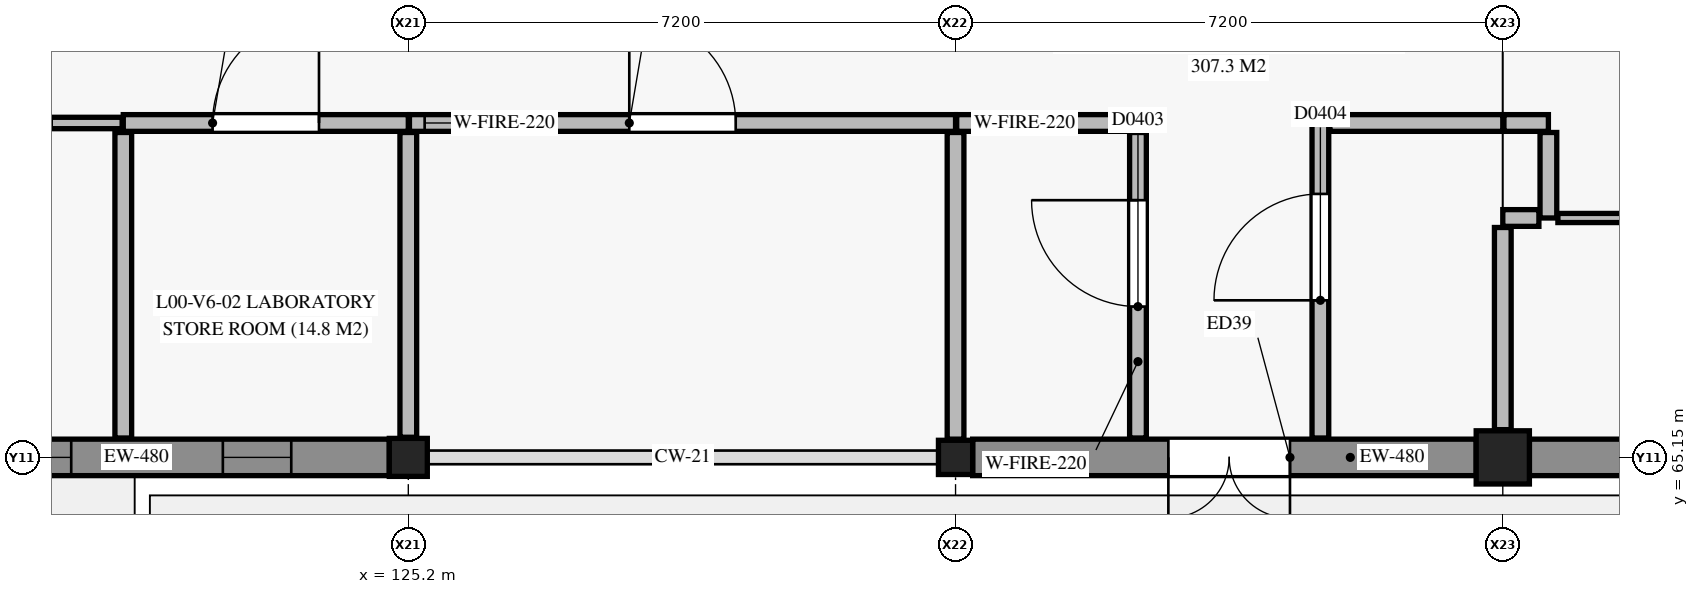
"""IFC4 building model, lengths in metres.
Left out: names, types, materials, properties, quantities, classifications, styles, units other than length and angle.
Written with IfcOpenShell. Run it as: python <this file> out.ifc"""

import sys

from ifc_helpers import new_model, si_unit, direction, frame, frame_2d, origin, origin_2d, place, context, subcontext, project, spatial, rectangle, circle, extrude, element, fill, save


model = new_model("IFC4")
c1 = context("Model", 3, precision=1e-05, world=origin(), true_north=direction((0.0, 1.0)))
c2 = subcontext(c1, "Body", "Model", "MODEL_VIEW")
j1 = project(units=[si_unit("LENGTHUNIT", "METRE"), si_unit("PLANEANGLEUNIT", "RADIAN")], contexts=[c1])
p1 = place(None, origin())
s1 = spatial("IfcSite", under=j1, at=p1, CompositionType="ELEMENT")
p2 = place(p1, origin())
s2 = spatial("IfcBuilding", under=s1, at=p2, CompositionType="ELEMENT")
p3 = place(p2, origin())
s3 = spatial("IfcBuildingStorey", under=s2, at=p3, CompositionType="ELEMENT", Elevation=0.0)
p4 = place(p3, frame((125.2, 65.15, 0.0), z_axis=(0.0, 0.0, 1.0), x_axis=(1.0, 0.0, 0.0)))
e1 = element("IfcColumn", 1, at=p4, inside=s3, PredefinedType="COLUMN", context=c2, shape_type="SweptSolid", body=[
    extrude(circle(Radius=0.25, at=origin_2d()), origin(), (0.0, 0.0, 1.0), 4.8),
])
p5 = place(p3, frame((132.4, 65.15, 0.0), z_axis=(0.0, 0.0, 1.0), x_axis=(1.0, 0.0, 0.0)))
e2 = element("IfcColumn", 2, at=p5, inside=s3, PredefinedType="COLUMN", context=c2, shape_type="SweptSolid", body=[
    extrude(rectangle(XDim=0.45, YDim=0.45, at=origin_2d()), origin(), (0.0, 0.0, 1.0), 4.8),
])
p6 = place(p3, frame((139.6, 65.15, 0.0), z_axis=(0.0, 0.0, 1.0), x_axis=(1.0, 0.0, 0.0)))
e3 = element("IfcColumn", 3, at=p6, inside=s3, PredefinedType="COLUMN", context=c2, shape_type="SweptSolid", body=[
    extrude(rectangle(XDim=0.7, YDim=0.7, at=origin_2d()), origin(), (0.0, 0.0, 1.0), 4.8),
])
p7 = place(p3, frame((146.55, 65.15, 0.0), z_axis=(0.0, 0.0, 1.0), x_axis=(-1.0, 0.0, 0.0)))
e4 = element("IfcWall", 4, at=p7, inside=s3, PredefinedType="SOLIDWALL", context=c2, shape_type="SweptSolid", body=[
    extrude(rectangle(XDim=6.6, YDim=0.48, at=frame_2d((3.3, 0.0))), origin(), (0.0, 0.0, 1.0), 3.7),
])
p8 = place(p7, frame((2.7, 0.0, 0.9)))
e5 = element("IfcOpeningElement", 5, at=p8, cuts=e4, PredefinedType="OPENING", context=c2, shape_type="SweptSolid", body=[
    extrude(rectangle(XDim=1.2, YDim=1.8, at=frame_2d((0.6, 0.9))), frame((0.0, 0.25, 0.0), z_axis=(0.0, -1.0, 0.0), x_axis=(1.0, 0.0, 0.0)), (0.0, 0.0, 1.0), 0.5),
])
p9 = place(p3, frame((139.25, 65.15, 0.0), z_axis=(0.0, 0.0, 1.0), x_axis=(-1.0, 0.0, 0.0)))
e6 = element("IfcWall", 6, at=p9, inside=s3, PredefinedType="SOLIDWALL", context=c2, shape_type="SweptSolid", body=[
    extrude(rectangle(XDim=6.625, YDim=0.48, at=frame_2d((3.312, 0.0))), origin(), (0.0, 0.0, 1.0), 3.7),
])
p10 = place(p9, frame((2.45, 0.0, 0.0)))
e7 = element("IfcOpeningElement", 7, at=p10, cuts=e6, PredefinedType="OPENING", context=c2, shape_type="SweptSolid", body=[
    extrude(rectangle(XDim=1.6, YDim=2.3, at=frame_2d((0.8, 1.15))), frame((0.0, 0.25, 0.0), z_axis=(0.0, -1.0, 0.0), x_axis=(1.0, 0.0, 0.0)), (0.0, 0.0, 1.0), 0.5),
])
p11 = place(p3, frame((124.95, 65.15, 0.0), z_axis=(0.0, 0.0, 1.0), x_axis=(-1.0, 0.0, 0.0)))
e8 = element("IfcWall", 8, at=p11, inside=s3, PredefinedType="SOLIDWALL", context=c2, shape_type="SweptSolid", body=[
    extrude(rectangle(XDim=6.65, YDim=0.48, at=frame_2d((3.325, 0.0))), origin(), (0.0, 0.0, 1.0), 3.7),
])
p12 = place(p11, frame((1.29, 0.0, 0.9)))
e9 = element("IfcOpeningElement", 9, at=p12, cuts=e8, PredefinedType="OPENING", context=c2, shape_type="SweptSolid", body=[
    extrude(rectangle(XDim=0.9, YDim=1.2, at=frame_2d((0.45, 0.6))), frame((0.0, 0.25, 0.0), z_axis=(0.0, -1.0, 0.0), x_axis=(1.0, 0.0, 0.0)), (0.0, 0.0, 1.0), 0.5),
])
p13 = place(p11, frame((4.185, 0.0, 0.9)))
e10 = element("IfcOpeningElement", 10, at=p13, cuts=e8, PredefinedType="OPENING", context=c2, shape_type="SweptSolid", body=[
    extrude(rectangle(XDim=1.8, YDim=0.9, at=frame_2d((0.9, 0.45))), frame((0.0, 0.25, 0.0), z_axis=(0.0, -1.0, 0.0), x_axis=(1.0, 0.0, 0.0)), (0.0, 0.0, 1.0), 0.5),
])
p14 = place(p3, frame((121.45, 69.55, 0.0), z_axis=(0.0, 0.0, 1.0), x_axis=(1.0, 0.0, 0.0)))
e11 = element("IfcWall", 11, at=p14, inside=s3, PredefinedType="PARTITIONING", context=c2, shape_type="SweptSolid", body=[
    extrude(rectangle(XDim=3.75, YDim=0.22, at=frame_2d((1.875, 0.0))), origin(), (0.0, 0.0, 1.0), 3.985),
])
p15 = place(p14, frame((1.175, 0.0, 0.0)))
e12 = element("IfcOpeningElement", 12, at=p15, cuts=e11, PredefinedType="OPENING", context=c2, shape_type="SweptSolid", body=[
    extrude(rectangle(XDim=1.4, YDim=2.2, at=frame_2d((0.7, 1.1))), frame((0.0, 0.12, 0.0), z_axis=(0.0, -1.0, 0.0), x_axis=(1.0, 0.0, 0.0)), (0.0, 0.0, 1.0), 0.24),
])
p16 = place(p3, frame((125.215, 69.55, 0.0), z_axis=(0.0, 0.0, 1.0), x_axis=(1.0, 0.0, 0.0)))
e13 = element("IfcWall", 13, at=p16, inside=s3, PredefinedType="PARTITIONING", context=c2, shape_type="SweptSolid", body=[
    extrude(rectangle(XDim=7.185, YDim=0.22, at=frame_2d((3.592, 0.0))), origin(), (0.0, 0.0, 1.0), 3.855),
])
p17 = place(p16, frame((2.893, 0.0, 0.0)))
e14 = element("IfcOpeningElement", 14, at=p17, cuts=e13, PredefinedType="OPENING", context=c2, shape_type="SweptSolid", body=[
    extrude(rectangle(XDim=1.4, YDim=2.2, at=frame_2d((0.7, 1.1))), frame((0.0, 0.12, 0.0), z_axis=(0.0, -1.0, 0.0), x_axis=(1.0, 0.0, 0.0)), (0.0, 0.0, 1.0), 0.24),
])
p18 = place(p16, frame((0.2, 0.0, 1.05)))
e15 = element("IfcOpeningElement", 15, at=p18, cuts=e13, PredefinedType="OPENING", context=c2, shape_type="SweptSolid", body=[
    extrude(rectangle(XDim=1.4, YDim=1.1, at=frame_2d((0.7, 0.55))), frame((0.0, 0.12, 0.0), z_axis=(0.0, -1.0, 0.0), x_axis=(1.0, 0.0, 0.0)), (0.0, 0.0, 1.0), 0.24),
])
p19 = place(p3, frame((132.415, 69.55, 0.0), z_axis=(0.0, 0.0, 1.0), x_axis=(1.0, 0.0, 0.0)))
e16 = element("IfcWall", 16, at=p19, inside=s3, PredefinedType="PARTITIONING", context=c2, shape_type="SweptSolid", body=[
    extrude(rectangle(XDim=2.385, YDim=0.22, at=frame_2d((1.192, 0.0))), origin(), (0.0, 0.0, 1.0), 3.855),
])
p20 = place(p3, frame((134.8, 65.405, 0.0), z_axis=(0.0, 0.0, 1.0), x_axis=(0.0, 1.0, 0.0)))
e17 = element("IfcWall", 17, at=p20, inside=s3, PredefinedType="PARTITIONING", context=c2, shape_type="SweptSolid", body=[
    extrude(rectangle(XDim=4.02, YDim=0.22, at=frame_2d((2.01, 0.0))), origin(), (0.0, 0.0, 1.0), 4.045),
])
p21 = place(p20, frame((1.729, 0.0, 0.0)))
e18 = element("IfcOpeningElement", 18, at=p21, cuts=e17, PredefinedType="OPENING", context=c2, shape_type="SweptSolid", body=[
    extrude(rectangle(XDim=1.4, YDim=2.2, at=frame_2d((0.7, 1.1))), frame((0.0, 0.12, 0.0), z_axis=(0.0, -1.0, 0.0), x_axis=(1.0, 0.0, 0.0)), (0.0, 0.0, 1.0), 0.24),
])
p22 = place(p3, frame((137.2, 65.405, 0.0), z_axis=(0.0, 0.0, 1.0), x_axis=(0.0, 1.0, 0.0)))
e19 = element("IfcWall", 19, at=p22, inside=s3, PredefinedType="PARTITIONING", context=c2, shape_type="SweptSolid", body=[
    extrude(rectangle(XDim=4.145, YDim=0.22, at=frame_2d((2.073, 0.0))), origin(), (0.0, 0.0, 1.0), 4.045),
])
p23 = place(p22, frame((1.812, 0.0, 0.0)))
e20 = element("IfcOpeningElement", 20, at=p23, cuts=e19, PredefinedType="OPENING", context=c2, shape_type="SweptSolid", body=[
    extrude(rectangle(XDim=1.4, YDim=2.2, at=frame_2d((0.7, 1.1))), frame((0.0, 0.12, 0.0), z_axis=(0.0, -1.0, 0.0), x_axis=(1.0, 0.0, 0.0)), (0.0, 0.0, 1.0), 0.24),
])
p24 = place(p3, frame((137.325, 69.55, 0.0), z_axis=(0.0, 0.0, 1.0), x_axis=(1.0, 0.0, 0.0)))
e21 = element("IfcWall", 21, at=p24, inside=s3, PredefinedType="PARTITIONING", context=c2, shape_type="SweptSolid", body=[
    extrude(rectangle(XDim=2.275, YDim=0.22, at=frame_2d((1.138, 0.0))), origin(), (0.0, 0.0, 1.0), 3.955),
])
p25 = place(p3, frame((139.615, 69.55, 0.0), z_axis=(0.0, 0.0, 1.0), x_axis=(1.0, 0.0, 0.0)))
e22 = element("IfcWall", 22, at=p25, inside=s3, PredefinedType="PARTITIONING", context=c2, shape_type="SweptSolid", body=[
    extrude(rectangle(XDim=0.585, YDim=0.22, at=frame_2d((0.292, 0.0))), origin(), (0.0, 0.0, 1.0), 3.955),
])
p26 = place(p3, frame((140.2, 68.3, 0.0), z_axis=(0.0, 0.0, 1.0), x_axis=(0.0, 1.0, 0.0)))
e23 = element("IfcWall", 23, at=p26, inside=s3, PredefinedType="PARTITIONING", context=c2, shape_type="SweptSolid", body=[
    extrude(rectangle(XDim=1.125, YDim=0.22, at=frame_2d((0.562, 0.0))), origin(), (0.0, 0.0, 1.0), 4.52),
])
p27 = place(p3, frame((139.6, 68.3, 0.0), z_axis=(0.0, 0.0, 1.0), x_axis=(1.0, 0.0, 0.0)))
e24 = element("IfcWall", 24, at=p27, inside=s3, PredefinedType="PARTITIONING", context=c2, shape_type="SweptSolid", body=[
    extrude(rectangle(XDim=0.475, YDim=0.22, at=frame_2d((0.237, 0.0))), origin(), (0.0, 0.0, 1.0), 3.955),
])
p28 = place(p3, frame((120.49, 69.55, 0.0), z_axis=(0.0, 0.0, 1.0), x_axis=(1.0, 0.0, 0.0)))
e25 = element("IfcWall", 25, at=p28, inside=s3, PredefinedType="PARTITIONING", context=c2, shape_type="SweptSolid", body=[
    extrude(rectangle(XDim=0.945, YDim=0.15, at=frame_2d((0.473, 0.0))), origin(), (0.0, 0.0, 1.0), 4.52),
])
p29 = place(p3, frame((140.325, 68.3, 0.0), z_axis=(0.0, 0.0, 1.0), x_axis=(1.0, 0.0, 0.0)))
e26 = element("IfcWall", 26, at=p29, inside=s3, PredefinedType="PARTITIONING", context=c2, shape_type="SweptSolid", body=[
    extrude(rectangle(XDim=2.16, YDim=0.12, at=frame_2d((1.08, 0.0))), origin(), (0.0, 0.0, 1.0), 4.52),
])
p30 = place(p3, frame((121.45, 65.405, 0.0), z_axis=(0.0, 0.0, 1.0), x_axis=(0.0, 1.0, 0.0)))
e27 = element("IfcWall", 27, at=p30, inside=s3, PredefinedType="PARTITIONING", context=c2, shape_type="SweptSolid", body=[
    extrude(rectangle(XDim=4.02, YDim=0.22, at=frame_2d((2.01, 0.0))), origin(), (0.0, 0.0, 1.0), 4.045),
])
p31 = place(p3, frame((125.2, 65.415, 0.0), z_axis=(0.0, 0.0, 1.0), x_axis=(0.0, 1.0, 0.0)))
e28 = element("IfcWall", 28, at=p31, inside=s3, PredefinedType="PARTITIONING", context=c2, shape_type="SweptSolid", body=[
    extrude(rectangle(XDim=4.01, YDim=0.22, at=frame_2d((2.005, 0.0))), origin(), (0.0, 0.0, 1.0), 3.985),
])
p32 = place(p3, frame((132.4, 65.39, 0.0), z_axis=(0.0, 0.0, 1.0), x_axis=(0.0, 1.0, 0.0)))
e29 = element("IfcWall", 29, at=p32, inside=s3, PredefinedType="PARTITIONING", context=c2, shape_type="SweptSolid", body=[
    extrude(rectangle(XDim=4.035, YDim=0.22, at=frame_2d((2.018, 0.0))), origin(), (0.0, 0.0, 1.0), 3.855),
])
p33 = place(p3, frame((139.6, 65.515, 0.0), z_axis=(0.0, 0.0, 1.0), x_axis=(0.0, 1.0, 0.0)))
e30 = element("IfcWall", 30, at=p33, inside=s3, PredefinedType="PARTITIONING", context=c2, shape_type="SweptSolid", body=[
    extrude(rectangle(XDim=2.66, YDim=0.22, at=frame_2d((1.33, 0.0))), origin(), (0.0, 0.0, 1.0), 3.955),
])
p34 = place(p10, origin())
e31 = element("IfcDoor", 31, at=p34, inside=s3, OperationType="DOUBLE_DOOR_SINGLE_SWING", PredefinedType="DOOR", context=c2, shape_type="SweptSolid", body=[
    extrude(rectangle(XDim=1.6, YDim=2.3, at=frame_2d((0.8, 1.15))), frame((0.0, 0.025, 0.0), z_axis=(0.0, -1.0, 0.0), x_axis=(1.0, 0.0, 0.0)), (0.0, 0.0, 1.0), 0.05),
])
fill(e7, e31)
p35 = place(p12, origin())
e32 = element("IfcWindow", 32, at=p35, inside=s3, PartitioningType="SINGLE_PANEL", PredefinedType="WINDOW", context=c2, shape_type="SweptSolid", body=[
    extrude(rectangle(XDim=0.9, YDim=1.2, at=frame_2d((0.45, 0.6))), frame((0.0, 0.03, 0.0), z_axis=(0.0, -1.0, 0.0), x_axis=(1.0, 0.0, 0.0)), (0.0, 0.0, 1.0), 0.06),
])
fill(e9, e32)
p36 = place(p13, origin())
e33 = element("IfcWindow", 33, at=p36, inside=s3, PartitioningType="SINGLE_PANEL", PredefinedType="WINDOW", context=c2, shape_type="SweptSolid", body=[
    extrude(rectangle(XDim=1.8, YDim=0.9, at=frame_2d((0.9, 0.45))), frame((0.0, 0.03, 0.0), z_axis=(0.0, -1.0, 0.0), x_axis=(1.0, 0.0, 0.0)), (0.0, 0.0, 1.0), 0.06),
])
fill(e10, e33)
p37 = place(p15, origin())
e34 = element("IfcDoor", 34, at=p37, inside=s3, OperationType="SINGLE_SWING_RIGHT", PredefinedType="DOOR", context=c2, shape_type="SweptSolid", body=[
    extrude(rectangle(XDim=1.4, YDim=2.2, at=frame_2d((0.7, 1.1))), frame((0.0, 0.025, 0.0), z_axis=(0.0, -1.0, 0.0), x_axis=(1.0, 0.0, 0.0)), (0.0, 0.0, 1.0), 0.05),
])
fill(e12, e34)
p38 = place(p17, origin())
e35 = element("IfcDoor", 35, at=p38, inside=s3, OperationType="SINGLE_SWING_LEFT", PredefinedType="DOOR", context=c2, shape_type="SweptSolid", body=[
    extrude(rectangle(XDim=1.4, YDim=2.2, at=frame_2d((0.7, 1.1))), frame((0.0, 0.025, 0.0), z_axis=(0.0, -1.0, 0.0), x_axis=(1.0, 0.0, 0.0)), (0.0, 0.0, 1.0), 0.05),
])
fill(e14, e35)
p39 = place(p18, origin())
e36 = element("IfcWindow", 36, at=p39, inside=s3, PartitioningType="SINGLE_PANEL", PredefinedType="WINDOW", context=c2, shape_type="SweptSolid", body=[
    extrude(rectangle(XDim=1.4, YDim=1.1, at=frame_2d((0.7, 0.55))), frame((0.0, 0.03, 0.0), z_axis=(0.0, -1.0, 0.0), x_axis=(1.0, 0.0, 0.0)), (0.0, 0.0, 1.0), 0.06),
])
fill(e15, e36)
p40 = place(p21, origin())
e37 = element("IfcDoor", 37, at=p40, inside=s3, OperationType="SINGLE_SWING_RIGHT", PredefinedType="DOOR", context=c2, shape_type="SweptSolid", body=[
    extrude(rectangle(XDim=1.4, YDim=2.2, at=frame_2d((0.7, 1.1))), frame((0.0, 0.025, 0.0), z_axis=(0.0, -1.0, 0.0), x_axis=(1.0, 0.0, 0.0)), (0.0, 0.0, 1.0), 0.05),
])
fill(e18, e37)
p41 = place(p23, origin())
e38 = element("IfcDoor", 38, at=p41, inside=s3, OperationType="SINGLE_SWING_LEFT", PredefinedType="DOOR", context=c2, shape_type="SweptSolid", body=[
    extrude(rectangle(XDim=1.4, YDim=2.2, at=frame_2d((0.7, 1.1))), frame((0.0, 0.025, 0.0), z_axis=(0.0, -1.0, 0.0), x_axis=(1.0, 0.0, 0.0)), (0.0, 0.0, 1.0), 0.05),
])
fill(e20, e38)
save(model, sys.argv[1])
